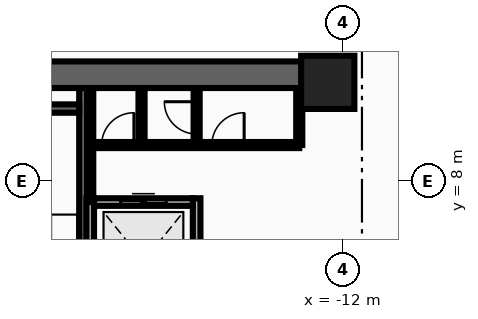
"""IFC4 building model, lengths in metres.
Left out: names, types, materials, properties, quantities, classifications, styles, units other than length and angle.
Written with IfcOpenShell. Run it as: python <this file> out.ifc"""

import sys

from ifc_helpers import new_model, si_unit, direction, frame, frame_2d, origin, origin_2d, place, context, subcontext, project, spatial, rectangle, extrude, source, transform, mapped, element, fill, save


model = new_model("IFC4")
c1 = context("Model", 3, precision=1e-05, world=origin(), true_north=direction((0.0, 1.0)))
c2 = subcontext(c1, "Body", "Model", "MODEL_VIEW")
j1 = project(units=[si_unit("LENGTHUNIT", "METRE"), si_unit("PLANEANGLEUNIT", "RADIAN")], contexts=[c1])
p1 = place(None, origin())
s1 = spatial("IfcSite", under=j1, at=p1, CompositionType="ELEMENT")
p2 = place(p1, origin())
s2 = spatial("IfcBuilding", under=s1, at=p2, CompositionType="ELEMENT")
p3 = place(p2, frame((0.0, 0.0, -9.6)))
s3 = spatial("IfcBuildingStorey", under=s2, at=p3, CompositionType="ELEMENT", Elevation=-9.6)
p4 = place(p3, frame((-18.83, 1.78, 0.0), z_axis=(0.0, 0.0, 1.0), x_axis=(0.0, 1.0, 0.0)))
e1 = element("IfcWall", 1, at=p4, inside=s3, PredefinedType="SHEAR", context=c2, shape_type="SweptSolid", body=[
    extrude(rectangle(XDim=8.67, YDim=0.22, at=frame_2d((4.335, 0.0))), origin(), (0.0, 0.0, 1.0), 4.54),
])
p5 = place(p3, frame((-22.05, 9.91, 0.0), z_axis=(0.0, 0.0, 1.0), x_axis=(1.0, 0.0, 0.0)))
e2 = element("IfcWall", 2, at=p5, inside=s3, PredefinedType="SHEAR", context=c2, shape_type="SweptSolid", body=[
    extrude(rectangle(XDim=3.11, YDim=0.22, at=frame_2d((1.555, 0.0))), origin(), (0.0, 0.0, 1.0), 4.54),
])
p6 = place(p3, frame((-22.65, 10.8, 0.0), z_axis=(0.0, 0.0, 1.0), x_axis=(1.0, 0.0, 0.0)))
e3 = element("IfcWall", 3, at=p6, inside=s3, PredefinedType="SHEAR", context=c2, shape_type="SweptSolid", body=[
    extrude(rectangle(XDim=10.25, YDim=0.7, at=frame_2d((5.125, 0.0))), origin(), (0.0, 0.0, 1.0), 4.54),
])
m1 = source(origin(), c2, "Body", "SweptSolid", [
    extrude(rectangle(XDim=1.4, YDim=1.4, at=origin_2d()), origin(), (0.0, 0.0, 1.0), 4.8),
])
p7 = place(p3, frame((-12.4, 10.6, 0.0), z_axis=(0.0, 0.0, 1.0), x_axis=(1.0, 0.0, 0.0)))
e4 = element("IfcColumn", 4, at=p7, inside=s3, PredefinedType="COLUMN", context=c2, shape_type="MappedRepresentation", body=[
    mapped(m1, transform((0.0, 0.0, 0.0), x_axis=(1.0, 0.0, 0.0), y_axis=(0.0, 1.0, 0.0), z_axis=(0.0, 0.0, 1.0), scale=1.0)),
])
for number, where, z_axis, x_axis in (
    (5, (-18.65, 4.225, 0.0), (0.0, 0.0, 1.0), (0.0, 1.0, 0.0)),
    (6, (-15.85, 4.225, 0.0), (0.0, 0.0, 1.0), (0.0, 1.0, 0.0)),
):
    element("IfcWall", number, at=place(p3, frame(where, z_axis=z_axis, x_axis=x_axis)), inside=s3, PredefinedType="MOVABLE", context=c2, shape_type="SweptSolid", body=[
        extrude(rectangle(XDim=3.325, YDim=0.2, at=frame_2d((1.663, 0.0))), origin(), (0.0, 0.0, 1.0), 4.54),
    ])
p8 = place(p3, frame((-18.55, 7.45, 0.0), z_axis=(0.0, 0.0, 1.0), x_axis=(1.0, 0.0, 0.0)))
e7 = element("IfcWall", 7, at=p8, inside=s3, PredefinedType="MOVABLE", context=c2, shape_type="SweptSolid", body=[
    extrude(rectangle(XDim=2.6, YDim=0.2, at=frame_2d((1.3, 0.0))), origin(), (0.0, 0.0, 1.0), 4.54),
])
p9 = place(p8, frame((0.7, 0.0, 0.0)))
e8 = element("IfcOpeningElement", 8, at=p9, cuts=e7, PredefinedType="OPENING", context=c2, shape_type="SweptSolid", body=[
    extrude(rectangle(XDim=1.2, YDim=2.1, at=frame_2d((0.6, 1.05))), frame((0.0, 0.115, 0.0), z_axis=(0.0, -1.0, 0.0), x_axis=(1.0, 0.0, 0.0)), (0.0, 0.0, 1.0), 0.23),
])
p10 = place(p3, frame((-18.65, 7.45, 0.0), z_axis=(0.0, 0.0, 1.0), x_axis=(0.0, 1.0, 0.0)))
e9 = element("IfcWall", 9, at=p10, inside=s3, PredefinedType="PARTITIONING", context=c2, shape_type="SweptSolid", body=[
    extrude(rectangle(XDim=2.93, YDim=0.16, at=frame_2d((1.465, 0.0))), origin(), (0.0, 0.0, 1.0), 3.577),
])
p11 = place(p3, frame((-18.65, 8.95, 0.0), z_axis=(0.0, 0.0, 1.0), x_axis=(1.0, 0.0, 0.0)))
e10 = element("IfcWall", 10, at=p11, inside=s3, PredefinedType="PARTITIONING", context=c2, shape_type="SweptSolid", body=[
    extrude(rectangle(XDim=5.5, YDim=0.16, at=frame_2d((2.75, 0.0))), origin(), (0.0, 0.0, 1.0), 4.54),
])
p12 = place(p11, frame((0.3, 0.0, 0.0)))
e11 = element("IfcOpeningElement", 11, at=p12, cuts=e10, PredefinedType="OPENING", context=c2, shape_type="SweptSolid", body=[
    extrude(rectangle(XDim=0.85, YDim=2.05, at=frame_2d((0.425, 1.025))), frame((0.0, 0.095, 0.0), z_axis=(0.0, -1.0, 0.0), x_axis=(1.0, 0.0, 0.0)), (0.0, 0.0, 1.0), 0.19),
])
p13 = place(p11, frame((3.2, 0.0, 0.0)))
e12 = element("IfcOpeningElement", 12, at=p13, cuts=e10, PredefinedType="OPENING", context=c2, shape_type="SweptSolid", body=[
    extrude(rectangle(XDim=0.85, YDim=2.05, at=frame_2d((0.425, 1.025))), frame((0.0, 0.095, 0.0), z_axis=(0.0, -1.0, 0.0), x_axis=(1.0, 0.0, 0.0)), (0.0, 0.0, 1.0), 0.19),
])
for number, where, z_axis, x_axis in (
    (13, (-13.15, 8.95, 0.0), (0.0, 0.0, 1.0), (0.0, 1.0, 0.0)),
    (14, (-17.3, 8.95, 0.0), (0.0, 0.0, 1.0), (0.0, 1.0, 0.0)),
):
    element("IfcWall", number, at=place(p3, frame(where, z_axis=z_axis, x_axis=x_axis)), inside=s3, PredefinedType="PARTITIONING", context=c2, shape_type="SweptSolid", body=[
        extrude(rectangle(XDim=1.43, YDim=0.16, at=frame_2d((0.715, 0.0))), origin(), (0.0, 0.0, 1.0), 3.577),
    ])
p14 = place(p3, frame((-15.85, 8.95, 0.0), z_axis=(0.0, 0.0, 1.0), x_axis=(0.0, 1.0, 0.0)))
e15 = element("IfcWall", 15, at=p14, inside=s3, PredefinedType="PARTITIONING", context=c2, shape_type="SweptSolid", body=[
    extrude(rectangle(XDim=1.43, YDim=0.16, at=frame_2d((0.715, 0.0))), origin(), (0.0, 0.0, 1.0), 3.577),
])
p15 = place(p14, frame((0.29, 0.0, 0.0)))
e16 = element("IfcOpeningElement", 16, at=p15, cuts=e15, PredefinedType="OPENING", context=c2, shape_type="SweptSolid", body=[
    extrude(rectangle(XDim=0.85, YDim=2.05, at=frame_2d((0.425, 1.025))), frame((0.0, 0.095, 0.0), z_axis=(0.0, -1.0, 0.0), x_axis=(1.0, 0.0, 0.0)), (0.0, 0.0, 1.0), 0.19),
])
p16 = place(p9, origin())
e17 = element("IfcDoor", 17, at=p16, inside=s3, OperationType="DOUBLE_DOOR_SLIDING", PredefinedType="DOOR", context=c2, shape_type="SweptSolid", body=[
    extrude(rectangle(XDim=1.2, YDim=2.1, at=frame_2d((0.6, 1.05))), frame((0.0, 0.025, 0.0), z_axis=(0.0, -1.0, 0.0), x_axis=(1.0, 0.0, 0.0)), (0.0, 0.0, 1.0), 0.05),
])
fill(e8, e17)
p17 = place(p12, origin())
e18 = element("IfcDoor", 18, at=p17, inside=s3, OperationType="SINGLE_SWING_LEFT", PredefinedType="DOOR", context=c2, shape_type="SweptSolid", body=[
    extrude(rectangle(XDim=0.85, YDim=2.05, at=frame_2d((0.425, 1.025))), frame((0.0, 0.025, 0.0), z_axis=(0.0, -1.0, 0.0), x_axis=(1.0, 0.0, 0.0)), (0.0, 0.0, 1.0), 0.05),
])
fill(e11, e18)
p18 = place(p13, origin())
e19 = element("IfcDoor", 19, at=p18, inside=s3, OperationType="SINGLE_SWING_RIGHT", PredefinedType="DOOR", context=c2, shape_type="SweptSolid", body=[
    extrude(rectangle(XDim=0.85, YDim=2.05, at=frame_2d((0.425, 1.025))), frame((0.0, 0.025, 0.0), z_axis=(0.0, -1.0, 0.0), x_axis=(1.0, 0.0, 0.0)), (0.0, 0.0, 1.0), 0.05),
])
fill(e12, e19)
p19 = place(p15, origin())
e20 = element("IfcDoor", 20, at=p19, inside=s3, OperationType="SINGLE_SWING_LEFT", PredefinedType="DOOR", context=c2, shape_type="SweptSolid", body=[
    extrude(rectangle(XDim=0.85, YDim=2.05, at=frame_2d((0.425, 1.025))), frame((0.0, 0.025, 0.0), z_axis=(0.0, -1.0, 0.0), x_axis=(1.0, 0.0, 0.0)), (0.0, 0.0, 1.0), 0.05),
])
fill(e16, e20)
save(model, sys.argv[1])
